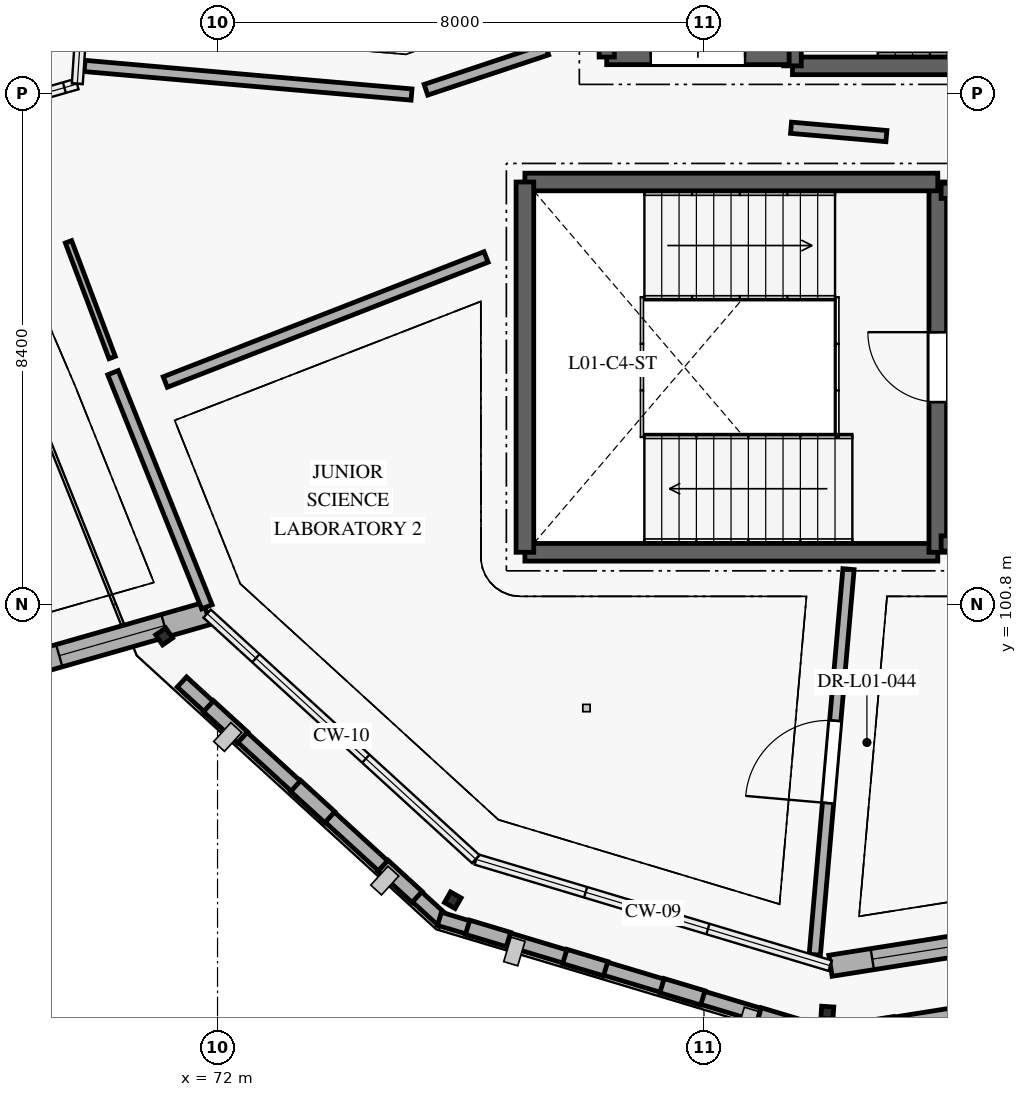
"""IFC4 building model, lengths in metres.
Left out: names, types, materials, properties, quantities, classifications, styles, units other than length and angle.
Written with IfcOpenShell. Run it as: python <this file> out.ifc"""

import sys

from ifc_helpers import new_model, si_unit, direction, frame, frame_2d, origin, origin_2d, place, context, subcontext, project, spatial, rectangle, hollow_rectangle, extrude, element, fill, save


model = new_model("IFC4")
c1 = context("Model", 3, precision=1e-05, world=origin(), true_north=direction((0.0, 1.0)))
c2 = subcontext(c1, "Body", "Model", "MODEL_VIEW")
j1 = project(units=[si_unit("LENGTHUNIT", "METRE"), si_unit("PLANEANGLEUNIT", "RADIAN")], contexts=[c1])
p1 = place(None, origin())
s1 = spatial("IfcSite", under=j1, at=p1, CompositionType="ELEMENT")
p2 = place(p1, origin())
s2 = spatial("IfcBuilding", under=s1, at=p2, CompositionType="ELEMENT")
p3 = place(p2, frame((0.0, 0.0, 4.2)))
s3 = spatial("IfcBuildingStorey", under=s2, at=p3, CompositionType="ELEMENT", Elevation=4.2)
for number, where, z_axis, x_axis in (
    (1, (71.122, 100.271, 0.0), (0.0, 0.0, 1.0), (0.569, -0.822, 0.0)),
    (2, (75.869, 95.932, 0.0), (0.0, 0.0, 1.0), (0.87, -0.493, 0.0)),
    (3, (82.028, 94.083, 0.0), (0.0, 0.0, 1.0), (0.998, -0.067, 0.0)),
):
    element("IfcColumn", number, at=place(p3, frame(where, z_axis=z_axis, x_axis=x_axis)), inside=s3, PredefinedType="COLUMN", context=c2, shape_type="SweptSolid", body=[
        extrude(hollow_rectangle(XDim=0.2, YDim=0.2, WallThickness=0.012, InnerFilletRadius=0.012, OuterFilletRadius=0.019, at=origin_2d()), origin(), (0.0, 0.0, 1.0), 4.2),
    ])
p4 = place(p3, frame((88.092, 95.806, 0.0), z_axis=(0.0, 0.0, 1.0), x_axis=(-0.987690665759, -0.156419783824, 0.0)))
e4 = element("IfcWall", 4, at=p4, inside=s3, PredefinedType="SOLIDWALL", context=c2, shape_type="SweptSolid", body=[
    extrude(rectangle(XDim=6.087, YDim=0.35, at=frame_2d((3.043, 0.0))), origin(), (0.0, 0.0, 1.0), 3.94),
])
p5 = place(p4, frame((0.772, 0.0, 0.85)))
e5 = element("IfcOpeningElement", 5, at=p5, cuts=e4, PredefinedType="OPENING", context=c2, shape_type="SweptSolid", body=[
    extrude(rectangle(XDim=1.5, YDim=1.6, at=frame_2d((0.75, 0.8))), frame((0.0, 0.185, 0.0), z_axis=(0.0, -1.0, 0.0), x_axis=(1.0, 0.0, 0.0)), (0.0, 0.0, 1.0), 0.37),
])
p6 = place(p4, frame((3.74, 0.0, 0.85)))
e6 = element("IfcOpeningElement", 6, at=p6, cuts=e4, PredefinedType="OPENING", context=c2, shape_type="SweptSolid", body=[
    extrude(rectangle(XDim=1.65, YDim=1.6, at=frame_2d((0.825, 0.8))), frame((0.0, 0.185, 0.0), z_axis=(0.0, -1.0, 0.0), x_axis=(1.0, 0.0, 0.0)), (0.0, 0.0, 1.0), 0.37),
])
p7 = place(p3, frame((71.826, 100.648, 0.0), z_axis=(0.0, 0.0, 1.0), x_axis=(-0.961523947641, -0.274721127897, 0.0)))
e7 = element("IfcWall", 7, at=p7, inside=s3, PredefinedType="SOLIDWALL", context=c2, shape_type="SweptSolid", body=[
    extrude(rectangle(XDim=6.509, YDim=0.38, at=frame_2d((3.254, 0.0))), origin(), (0.0, 0.0, 1.0), 3.132),
])
p8 = place(p7, frame((0.727, 0.0, 0.85)))
e8 = element("IfcOpeningElement", 8, at=p8, cuts=e7, PredefinedType="OPENING", context=c2, shape_type="SweptSolid", body=[
    extrude(rectangle(XDim=1.8, YDim=1.6, at=frame_2d((0.9, 0.8))), frame((0.0, 0.2, 0.0), z_axis=(0.0, -1.0, 0.0), x_axis=(1.0, 0.0, 0.0)), (0.0, 0.0, 1.0), 0.4),
])
p9 = place(p7, frame((3.906, 0.0, 0.85)))
e9 = element("IfcOpeningElement", 9, at=p9, cuts=e7, PredefinedType="OPENING", context=c2, shape_type="SweptSolid", body=[
    extrude(rectangle(XDim=1.95, YDim=1.6, at=frame_2d((0.975, 0.8))), frame((0.0, 0.2, 0.0), z_axis=(0.0, -1.0, 0.0), x_axis=(1.0, 0.0, 0.0)), (0.0, 0.0, 1.0), 0.4),
])
p10 = place(p3, frame((71.414, 99.521, 0.0), z_axis=(0.0, 0.0, 1.0), x_axis=(0.73814554437, -0.674641501337, 0.0)))
e10 = element("IfcWall", 10, at=p10, inside=s3, PredefinedType="ELEMENTEDWALL", context=c2, shape_type="SweptSolid", body=[
    extrude(rectangle(XDim=5.832, YDim=0.225, at=frame_2d((2.916, 0.0))), origin(), (0.0, 0.0, 1.0), 1.09),
])
p11 = place(p3, frame((71.851, 99.122, 1.09), z_axis=(0.0, 0.0, 1.0), x_axis=(0.738033381673, -0.674764201434, 0.0)))
e11 = element("IfcWall", 11, at=p11, inside=s3, PredefinedType="ELEMENTEDWALL", context=c2, shape_type="SweptSolid", body=[
    extrude(rectangle(XDim=0.76, YDim=0.245, at=frame_2d((0.38, 0.0))), origin(), (0.0, 0.0, 1.0), 2.85),
])
p12 = place(p3, frame((73.286, 97.811, 1.09), z_axis=(0.0, 0.0, 1.0), x_axis=(0.738047098779, -0.674749197839, 0.0)))
e12 = element("IfcWall", 12, at=p12, inside=s3, PredefinedType="ELEMENTEDWALL", context=c2, shape_type="SweptSolid", body=[
    extrude(rectangle(XDim=0.76, YDim=0.245, at=frame_2d((0.38, 0.0))), origin(), (0.0, 0.0, 1.0), 2.85),
])
p13 = place(p3, frame((74.721, 96.499, 1.09), z_axis=(0.0, 0.0, 1.0), x_axis=(0.738033381673, -0.674764201434, 0.0)))
e13 = element("IfcWall", 13, at=p13, inside=s3, PredefinedType="ELEMENTEDWALL", context=c2, shape_type="SweptSolid", body=[
    extrude(rectangle(XDim=0.76, YDim=0.245, at=frame_2d((0.38, 0.0))), origin(), (0.0, 0.0, 1.0), 2.85),
])
p14 = place(p3, frame((75.649, 95.626, 0.0), z_axis=(0.0, 0.0, 1.0), x_axis=(0.957749751871, -0.287602873404, 0.0)))
e14 = element("IfcWall", 14, at=p14, inside=s3, PredefinedType="ELEMENTEDWALL", context=c2, shape_type="SweptSolid", body=[
    extrude(rectangle(XDim=6.676, YDim=0.225, at=frame_2d((3.338, 0.0))), origin(), (0.0, 0.0, 1.0), 1.09),
])
for number, where, z_axis, x_axis in (
    (15, (76.113, 95.487, 1.09), (0.0, 0.0, 1.0), (0.958, -0.288, 0.0)),
    (16, (77.711, 95.007, 1.09), (0.0, 0.0, 1.0), (0.958, -0.288, 0.0)),
    (17, (79.31, 94.527, 1.09), (0.0, 0.0, 1.0), (0.958, -0.287, 0.0)),
    (18, (80.908, 94.047, 1.09), (0.0, 0.0, 1.0), (0.958, -0.287, 0.0)),
):
    element("IfcWall", number, at=place(p3, frame(where, z_axis=z_axis, x_axis=x_axis)), inside=s3, PredefinedType="ELEMENTEDWALL", context=c2, shape_type="SweptSolid", body=[
        extrude(rectangle(XDim=0.701, YDim=0.245, at=frame_2d((0.351, 0.0))), origin(), (0.0, 0.0, 1.0), 2.85),
    ])
p15 = place(p3, frame((81.963, 93.712, 0.0), z_axis=(0.0, 0.0, 1.0), x_axis=(0.987690206406, 0.156422684322, 0.0)))
e19 = element("IfcWall", 19, at=p15, inside=s3, PredefinedType="ELEMENTEDWALL", context=c2, shape_type="SweptSolid", body=[
    extrude(rectangle(XDim=6.676, YDim=0.225, at=frame_2d((3.338, 0.0))), origin(), (0.0, 0.0, 1.0), 1.09),
])
p16 = place(p3, frame((82.441, 93.788, 1.09), z_axis=(0.0, 0.0, 1.0), x_axis=(0.987697931756, 0.156373896812, 0.0)))
e20 = element("IfcWall", 20, at=p16, inside=s3, PredefinedType="ELEMENTEDWALL", context=c2, shape_type="SweptSolid", body=[
    extrude(rectangle(XDim=0.701, YDim=0.245, at=frame_2d((0.351, 0.0))), origin(), (0.0, 0.0, 1.0), 2.85),
])
p17 = place(p3, frame((77.055, 101.655, 0.0), z_axis=(0.0, 0.0, 1.0), x_axis=(1.0, 0.0, 0.0)))
e21 = element("IfcWall", 21, at=p17, inside=s3, PredefinedType="SHEAR", context=c2, shape_type="SweptSolid", body=[
    extrude(rectangle(XDim=6.79, YDim=0.29, at=frame_2d((3.395, 0.0))), origin(), (0.0, 0.0, 1.0), 3.95),
])
p18 = place(p3, frame((83.845, 101.655, 0.0), z_axis=(0.0, 0.0, 1.0), x_axis=(0.0, 1.0, 0.0)))
e22 = element("IfcWall", 22, at=p18, inside=s3, PredefinedType="SHEAR", context=c2, shape_type="SweptSolid", body=[
    extrude(rectangle(XDim=6.09, YDim=0.29, at=frame_2d((3.045, 0.0))), origin(), (0.0, 0.0, 1.0), 3.95),
])
p19 = place(p18, frame((2.47, 0.0, 0.0)))
e23 = element("IfcOpeningElement", 23, at=p19, cuts=e22, PredefinedType="OPENING", context=c2, shape_type="SweptSolid", body=[
    extrude(rectangle(XDim=1.15, YDim=2.1, at=frame_2d((0.575, 1.05))), frame((0.0, 0.155, 0.0), z_axis=(0.0, -1.0, 0.0), x_axis=(1.0, 0.0, 0.0)), (0.0, 0.0, 1.0), 0.31),
])
p20 = place(p3, frame((83.845, 107.745, 0.0), z_axis=(0.0, 0.0, 1.0), x_axis=(-1.0, 0.0, 0.0)))
e24 = element("IfcWall", 24, at=p20, inside=s3, PredefinedType="SHEAR", context=c2, shape_type="SweptSolid", body=[
    extrude(rectangle(XDim=6.79, YDim=0.29, at=frame_2d((3.395, 0.0))), origin(), (0.0, 0.0, 1.0), 3.95),
])
p21 = place(p3, frame((77.055, 107.745, 0.0), z_axis=(0.0, 0.0, 1.0), x_axis=(0.0, -1.0, 0.0)))
e25 = element("IfcWall", 25, at=p21, inside=s3, PredefinedType="SHEAR", context=c2, shape_type="SweptSolid", body=[
    extrude(rectangle(XDim=6.09, YDim=0.29, at=frame_2d((3.045, 0.0))), origin(), (0.0, 0.0, 1.0), 3.95),
])
p22 = place(p3, frame((83.9, 101.8, 0.0), z_axis=(0.0, 0.0, 1.0), x_axis=(1.0, 0.0, 0.0)))
e26 = element("IfcWall", 26, at=p22, inside=s3, PredefinedType="SHEAR", context=c2, shape_type="SweptSolid", body=[
    extrude(rectangle(XDim=3.0, YDim=0.25, at=frame_2d((1.5, 0.0))), origin(), (0.0, 0.0, 1.0), 3.95),
])
p23 = place(p3, frame((86.9, 107.6, 0.0), z_axis=(0.0, 0.0, 1.0), x_axis=(-1.0, 0.0, 0.0)))
e27 = element("IfcWall", 27, at=p23, inside=s3, PredefinedType="SHEAR", context=c2, shape_type="SweptSolid", body=[
    extrude(rectangle(XDim=3.0, YDim=0.25, at=frame_2d((1.5, 0.0))), origin(), (0.0, 0.0, 1.0), 3.95),
])
p24 = place(p23, frame((0.725, 0.0, 0.0)))
e28 = element("IfcOpeningElement", 28, at=p24, cuts=e27, PredefinedType="OPENING", context=c2, shape_type="SweptSolid", body=[
    extrude(rectangle(XDim=1.55, YDim=2.15, at=frame_2d((0.775, 1.075))), frame((0.0, 0.135, 0.0), z_axis=(0.0, -1.0, 0.0), x_axis=(1.0, 0.0, 0.0)), (0.0, 0.0, 1.0), 0.27),
])
p25 = place(p3, frame((81.455, 109.655, 0.0), z_axis=(0.0, 0.0, 1.0), x_axis=(1.0, 0.0, 0.0)))
e29 = element("IfcWall", 29, at=p25, inside=s3, PredefinedType="SHEAR", context=c2, shape_type="SweptSolid", body=[
    extrude(rectangle(XDim=6.79, YDim=0.29, at=frame_2d((3.395, 0.0))), origin(), (0.0, 0.0, 1.0), 3.95),
])
p26 = place(p3, frame((81.455, 115.745, 0.0), z_axis=(0.0, 0.0, 1.0), x_axis=(0.0, -1.0, 0.0)))
e30 = element("IfcWall", 30, at=p26, inside=s3, PredefinedType="SHEAR", context=c2, shape_type="SweptSolid", body=[
    extrude(rectangle(XDim=6.09, YDim=0.29, at=frame_2d((3.045, 0.0))), origin(), (0.0, 0.0, 1.0), 3.95),
])
p27 = place(p26, frame((2.47, 0.0, 0.0)))
e31 = element("IfcOpeningElement", 31, at=p27, cuts=e30, PredefinedType="OPENING", context=c2, shape_type="SweptSolid", body=[
    extrude(rectangle(XDim=1.15, YDim=2.1, at=frame_2d((0.575, 1.05))), frame((0.0, 0.155, 0.0), z_axis=(0.0, -1.0, 0.0), x_axis=(1.0, 0.0, 0.0)), (0.0, 0.0, 1.0), 0.31),
])
p28 = place(p3, frame((78.4, 109.8, 0.0), z_axis=(0.0, 0.0, 1.0), x_axis=(1.0, 0.0, 0.0)))
e32 = element("IfcWall", 32, at=p28, inside=s3, PredefinedType="SHEAR", context=c2, shape_type="SweptSolid", body=[
    extrude(rectangle(XDim=3.0, YDim=0.25, at=frame_2d((1.5, 0.0))), origin(), (0.0, 0.0, 1.0), 3.95),
])
p29 = place(p28, frame((0.725, 0.0, 0.0)))
e33 = element("IfcOpeningElement", 33, at=p29, cuts=e32, PredefinedType="OPENING", context=c2, shape_type="SweptSolid", body=[
    extrude(rectangle(XDim=1.55, YDim=2.15, at=frame_2d((0.775, 1.075))), frame((0.0, 0.135, 0.0), z_axis=(0.0, -1.0, 0.0), x_axis=(1.0, 0.0, 0.0)), (0.0, 0.0, 1.0), 0.27),
])
p30 = place(p3, frame((78.4, 115.6, 0.0), z_axis=(0.0, 0.0, 1.0), x_axis=(0.0, -1.0, 0.0)))
e34 = element("IfcWall", 34, at=p30, inside=s3, PredefinedType="SHEAR", context=c2, shape_type="SweptSolid", body=[
    extrude(rectangle(XDim=5.8, YDim=0.25, at=frame_2d((2.9, 0.0))), origin(), (0.0, 0.0, 1.0), 3.95),
])
p31 = place(p3, frame((81.431, 108.637, 0.0), z_axis=(0.0, 0.0, 1.0), x_axis=(0.996196241539, -0.08713809926, 0.0)))
e35 = element("IfcWall", 35, at=p31, inside=s3, PredefinedType="PARTITIONING", context=c2, shape_type="SweptSolid", body=[
    extrude(rectangle(XDim=1.575, YDim=0.185, at=frame_2d((0.787, 0.0))), origin(), (0.0, 0.0, 1.0), 3.93),
])
p32 = place(p3, frame((69.814, 109.654, 0.0), z_axis=(0.0, 0.0, 1.0), x_axis=(0.996193422883, -0.087170317223, 0.0)))
e36 = element("IfcWall", 36, at=p32, inside=s3, PredefinedType="PARTITIONING", context=c2, shape_type="SweptSolid", body=[
    extrude(rectangle(XDim=5.397, YDim=0.185, at=frame_2d((2.698, 0.0))), origin(), (0.0, 0.0, 1.0), 3.93),
])
p33 = place(p3, frame((75.427, 109.262, 0.0), z_axis=(0.0, 0.0, 1.0), x_axis=(0.948904309967, 0.315563956315, 0.0)))
e37 = element("IfcWall", 37, at=p33, inside=s3, PredefinedType="PARTITIONING", context=c2, shape_type="SweptSolid", body=[
    extrude(rectangle(XDim=2.097, YDim=0.185, at=frame_2d((1.048, 0.0))), origin(), (0.0, 0.0, 1.0), 3.93),
])
p34 = place(p3, frame((76.416, 106.512, 0.0), z_axis=(0.0, 0.0, 1.0), x_axis=(-0.931696873331, -0.363236749552, 0.0)))
e38 = element("IfcWall", 38, at=p34, inside=s3, PredefinedType="PARTITIONING", context=c2, shape_type="SweptSolid", body=[
    extrude(rectangle(XDim=5.663, YDim=0.185, at=frame_2d((2.831, 0.0))), origin(), (0.0, 0.0, 1.0), 3.93),
])
p35 = place(p3, frame((70.281, 104.609, 0.0), z_axis=(0.0, 0.0, 1.0), x_axis=(0.372242733262, -0.928135414438, 0.0)))
e39 = element("IfcWall", 39, at=p35, inside=s3, PredefinedType="PARTITIONING", context=c2, shape_type="SweptSolid", body=[
    extrude(rectangle(XDim=4.149, YDim=0.185, at=frame_2d((2.074, 0.0))), origin(), (0.0, 0.0, 1.0), 3.93),
])
p36 = place(p3, frame((81.822, 95.036, 0.0), z_axis=(0.0, 0.0, 1.0), x_axis=(0.08717408664, 0.996193093039, 0.0)))
e40 = element("IfcWall", 40, at=p36, inside=s3, PredefinedType="PARTITIONING", context=c2, shape_type="SweptSolid", body=[
    extrude(rectangle(XDim=6.366, YDim=0.185, at=frame_2d((3.183, 0.0))), origin(), (0.0, 0.0, 1.0), 3.93),
])
p37 = place(p36, frame((2.503, 0.0, 0.0)))
e41 = element("IfcOpeningElement", 41, at=p37, cuts=e40, PredefinedType="OPENING", context=c2, shape_type="SweptSolid", body=[
    extrude(rectangle(XDim=1.36, YDim=2.14, at=frame_2d((0.68, 1.07))), frame((0.0, 0.103, 0.0), z_axis=(0.0, -1.0, 0.0), x_axis=(1.0, 0.0, 0.0)), (0.0, 0.0, 1.0), 0.205),
])
p38 = place(p3, frame((70.267, 104.858, 0.0), z_axis=(0.0, 0.0, 1.0), x_axis=(-0.353094901798, 0.935587510778, 0.0)))
e42 = element("IfcWall", 42, at=p38, inside=s3, PredefinedType="PARTITIONING", context=c2, shape_type="SweptSolid", body=[
    extrude(rectangle(XDim=2.035, YDim=0.11, at=frame_2d((1.018, 0.0))), origin(), (0.0, 0.0, 1.0), 3.93),
])
p39 = place(p6, origin())
e43 = element("IfcWindow", 43, at=p39, inside=s3, PartitioningType="SINGLE_PANEL", PredefinedType="WINDOW", context=c2, shape_type="SweptSolid", body=[
    extrude(rectangle(XDim=1.65, YDim=1.6, at=frame_2d((0.825, 0.8))), frame((0.0, 0.03, 0.0), z_axis=(0.0, -1.0, 0.0), x_axis=(1.0, 0.0, 0.0)), (0.0, 0.0, 1.0), 0.06),
])
fill(e6, e43)
p40 = place(p8, origin())
e44 = element("IfcWindow", 44, at=p40, inside=s3, PartitioningType="SINGLE_PANEL", PredefinedType="WINDOW", context=c2, shape_type="SweptSolid", body=[
    extrude(rectangle(XDim=1.8, YDim=1.6, at=frame_2d((0.9, 0.8))), frame((0.0, 0.03, 0.0), z_axis=(0.0, -1.0, 0.0), x_axis=(1.0, 0.0, 0.0)), (0.0, 0.0, 1.0), 0.06),
])
fill(e8, e44)
p41 = place(p19, origin())
e45 = element("IfcDoor", 45, at=p41, inside=s3, OperationType="SINGLE_SWING_RIGHT", PredefinedType="DOOR", context=c2, shape_type="SweptSolid", body=[
    extrude(rectangle(XDim=1.15, YDim=2.1, at=frame_2d((0.575, 1.05))), frame((0.0, 0.025, 0.0), z_axis=(0.0, -1.0, 0.0), x_axis=(1.0, 0.0, 0.0)), (0.0, 0.0, 1.0), 0.05),
])
fill(e23, e45)
p42 = place(p29, origin())
e46 = element("IfcDoor", 46, at=p42, inside=s3, OperationType="DOUBLE_DOOR_SINGLE_SWING", PredefinedType="DOOR", context=c2, shape_type="SweptSolid", body=[
    extrude(rectangle(XDim=1.55, YDim=2.15, at=frame_2d((0.775, 1.075))), frame((0.0, 0.025, 0.0), z_axis=(0.0, -1.0, 0.0), x_axis=(1.0, 0.0, 0.0)), (0.0, 0.0, 1.0), 0.05),
])
fill(e33, e46)
p43 = place(p37, origin())
e47 = element("IfcDoor", 47, at=p43, inside=s3, OperationType="SINGLE_SWING_LEFT", PredefinedType="DOOR", context=c2, shape_type="SweptSolid", body=[
    extrude(rectangle(XDim=1.36, YDim=2.14, at=frame_2d((0.68, 1.07))), frame((0.0, 0.025, 0.0), z_axis=(0.0, -1.0, 0.0), x_axis=(1.0, 0.0, 0.0)), (0.0, 0.0, 1.0), 0.05),
])
fill(e41, e47)
save(model, sys.argv[1])
